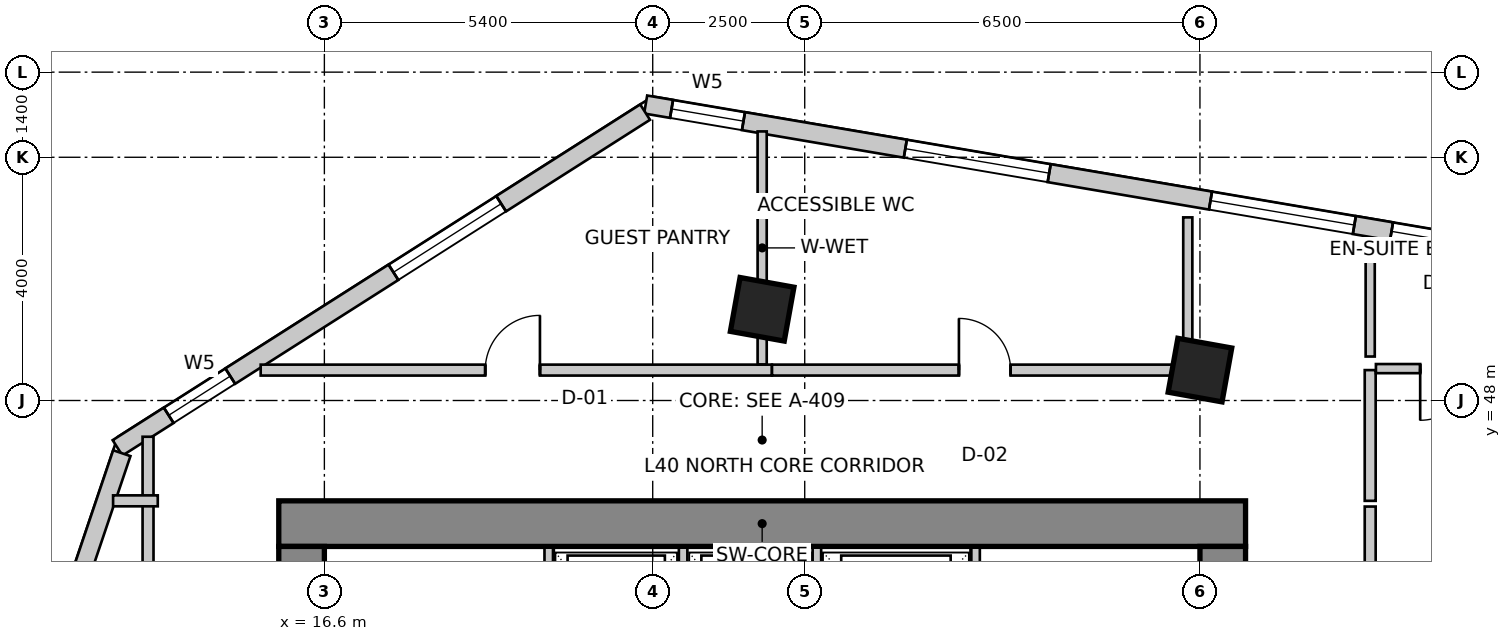
"""IFC4 building model, lengths in metres.
Left out: names, types, materials, properties, quantities, classifications, styles, units other than length and angle.
Written with IfcOpenShell. Run it as: python <this file> out.ifc"""

import sys

from ifc_helpers import new_model, si_unit, direction, frame, frame_2d, origin, origin_2d, place, context, subcontext, project, spatial, rectangle, extrude, source, transform, mapped, element, fill, save


model = new_model("IFC4")
c1 = context("Model", 3, precision=1e-05, world=origin(), true_north=direction((0.0, 1.0)))
c2 = subcontext(c1, "Body", "Model", "MODEL_VIEW")
j1 = project(units=[si_unit("LENGTHUNIT", "METRE"), si_unit("PLANEANGLEUNIT", "RADIAN")], contexts=[c1])
p1 = place(None, origin())
s1 = spatial("IfcSite", under=j1, at=p1, CompositionType="ELEMENT")
p2 = place(p1, origin())
s2 = spatial("IfcBuilding", under=s1, at=p2, CompositionType="ELEMENT")
p3 = place(p2, frame((0.0, 0.0, 161.0)))
s3 = spatial("IfcBuildingStorey", under=s2, at=p3, CompositionType="ELEMENT", Elevation=161.0)
p4 = place(p3, frame((15.85, 45.975, 0.0), z_axis=(0.0, 0.0, 1.0), x_axis=(1.0, 0.0, 0.0)))
e1 = element("IfcWall", 1, at=p4, inside=s3, PredefinedType="SHEAR", context=c2, shape_type="SweptSolid", body=[
    extrude(rectangle(XDim=15.9, YDim=0.75, at=frame_2d((7.95, 0.0))), origin(), (0.0, 0.0, 1.0), 3.6),
])
p5 = place(p3, frame((16.225, 34.2, 0.0), z_axis=(0.0, 0.0, 1.0), x_axis=(0.0, 1.0, 0.0)))
e2 = element("IfcWall", 2, at=p5, inside=s3, PredefinedType="SHEAR", context=c2, shape_type="SweptSolid", body=[
    extrude(rectangle(XDim=11.4, YDim=0.75, at=frame_2d((5.7, 0.0))), origin(), (0.0, 0.0, 1.0), 3.6),
])
m1 = source(origin(), c2, "Body", "SweptSolid", [
    extrude(rectangle(XDim=1.1, YDim=2.15, at=frame_2d((0.55, 1.075))), frame((0.0, 0.385, 0.0), z_axis=(0.0, -1.0, 0.0), x_axis=(1.0, 0.0, 0.0)), (0.0, 0.0, 1.0), 0.77),
])
p6 = place(p5, frame((7.15, 0.0, 0.0)))
e3 = element("IfcOpeningElement", 3, at=p6, cuts=e2, PredefinedType="OPENING", context=c2, shape_type="MappedRepresentation", body=[
    mapped(m1, transform((0.0, 0.0, 0.0), scale=1.0)),
])
p7 = place(p3, frame((31.375, 34.2, 0.0), z_axis=(0.0, 0.0, 1.0), x_axis=(0.0, 1.0, 0.0)))
e4 = element("IfcWall", 4, at=p7, inside=s3, PredefinedType="SHEAR", context=c2, shape_type="SweptSolid", body=[
    extrude(rectangle(XDim=11.4, YDim=0.75, at=frame_2d((5.7, 0.0))), origin(), (0.0, 0.0, 1.0), 3.6),
])
p8 = place(p7, frame((7.35, 0.0, 0.0)))
e5 = element("IfcOpeningElement", 5, at=p8, cuts=e4, PredefinedType="OPENING", context=c2, shape_type="MappedRepresentation", body=[
    mapped(m1, transform((0.0, 0.0, 0.0), scale=1.0)),
])
m2 = source(origin(), c2, "Body", "SweptSolid", [
    extrude(rectangle(XDim=0.9, YDim=0.9, at=origin_2d()), origin(), (0.0, 0.0, 1.0), 3.6),
])
for number, where, z_axis, x_axis in (
    (6, (23.8, 49.5, 0.0), (0.0, 0.0, 1.0), (0.984, -0.177, 0.0)),
    (7, (31.0, 48.5, 0.0), (0.0, 0.0, 1.0), (0.984, -0.177, 0.0)),
):
    element("IfcColumn", number, at=place(p3, frame(where, z_axis=z_axis, x_axis=x_axis)), inside=s3, PredefinedType="COLUMN", context=c2, shape_type="MappedRepresentation", body=[
        mapped(m2, transform((0.0, 0.0, 0.0), scale=1.0)),
    ])
p9 = place(p3, frame((53.561, 47.48, 0.0), z_axis=(0.0, 0.0, 1.0), x_axis=(-0.985845173895, 0.167658262868, 0.0)))
e8 = element("IfcWall", 8, at=p9, inside=s3, PredefinedType="SOLIDWALL", context=c2, shape_type="SweptSolid", body=[
    extrude(rectangle(XDim=32.132, YDim=0.3, at=frame_2d((16.066, 0.0))), origin(), (0.0, 0.0, 1.0), 3.35),
])
m3 = source(origin(), c2, "Body", "SweptSolid", [
    extrude(rectangle(XDim=2.4, YDim=2.2, at=frame_2d((1.2, 1.1))), frame((0.0, 0.16, 0.0), z_axis=(0.0, -1.0, 0.0), x_axis=(1.0, 0.0, 0.0)), (0.0, 0.0, 1.0), 0.32),
])
p10 = place(p9, frame((0.882, 0.0, 0.85)))
e9 = element("IfcOpeningElement", 9, at=p10, cuts=e8, PredefinedType="OPENING", context=c2, shape_type="MappedRepresentation", body=[
    mapped(m3, transform((0.0, 0.0, 0.0), scale=1.0)),
])
p11 = place(p9, frame((5.637, 0.0, 0.85)))
e10 = element("IfcOpeningElement", 10, at=p11, cuts=e8, PredefinedType="OPENING", context=c2, shape_type="MappedRepresentation", body=[
    mapped(m3, transform((0.0, 0.0, 0.0), scale=1.0)),
])
m4 = source(origin(), c2, "Body", "SweptSolid", [
    extrude(rectangle(XDim=1.8, YDim=2.1, at=frame_2d((0.9, 1.05))), frame((0.0, 0.16, 0.0), z_axis=(0.0, -1.0, 0.0), x_axis=(1.0, 0.0, 0.0)), (0.0, 0.0, 1.0), 0.32),
])
p12 = place(p9, frame((9.928, 0.0, 0.85)))
e11 = element("IfcOpeningElement", 11, at=p12, cuts=e8, PredefinedType="OPENING", context=c2, shape_type="MappedRepresentation", body=[
    mapped(m4, transform((0.0, 0.0, 0.0), scale=1.0)),
])
p13 = place(p9, frame((13.618, 0.0, 0.85)))
e12 = element("IfcOpeningElement", 12, at=p13, cuts=e8, PredefinedType="OPENING", context=c2, shape_type="MappedRepresentation", body=[
    mapped(m3, transform((0.0, 0.0, 0.0), scale=1.0)),
])
p14 = place(p9, frame((17.889, 0.0, 0.85)))
e13 = element("IfcOpeningElement", 13, at=p14, cuts=e8, PredefinedType="OPENING", context=c2, shape_type="MappedRepresentation", body=[
    mapped(m4, transform((0.0, 0.0, 0.0), scale=1.0)),
])
p15 = place(p9, frame((20.309, 0.0, 0.85)))
e14 = element("IfcOpeningElement", 14, at=p15, cuts=e8, PredefinedType="OPENING", context=c2, shape_type="MappedRepresentation", body=[
    mapped(m3, transform((0.0, 0.0, 0.0), scale=1.0)),
])
p16 = place(p9, frame((25.4, 0.0, 0.85)))
e15 = element("IfcOpeningElement", 15, at=p16, cuts=e8, PredefinedType="OPENING", context=c2, shape_type="MappedRepresentation", body=[
    mapped(m3, transform((0.0, 0.0, 0.0), scale=1.0)),
])
m5 = source(origin(), c2, "Body", "SweptSolid", [
    extrude(rectangle(XDim=1.2, YDim=1.6, at=frame_2d((0.6, 0.8))), frame((0.0, 0.16, 0.0), z_axis=(0.0, -1.0, 0.0), x_axis=(1.0, 0.0, 0.0)), (0.0, 0.0, 1.0), 0.32),
])
p17 = place(p9, frame((30.5, 0.0, 0.85)))
e16 = element("IfcOpeningElement", 16, at=p17, cuts=e8, PredefinedType="OPENING", context=c2, shape_type="MappedRepresentation", body=[
    mapped(m5, transform((0.0, 0.0, 0.0), scale=1.0)),
])
p18 = place(p3, frame((21.875, 52.742, 0.0), z_axis=(0.0, 0.0, 1.0), x_axis=(-0.843662465249, -0.536873956092, 0.0)))
e17 = element("IfcWall", 17, at=p18, inside=s3, PredefinedType="SOLIDWALL", context=c2, shape_type="SweptSolid", body=[
    extrude(rectangle(XDim=10.284, YDim=0.3, at=frame_2d((5.142, 0.0))), origin(), (0.0, 0.0, 1.0), 3.35),
])
m6 = source(origin(), c2, "Body", "SweptSolid", [
    extrude(rectangle(XDim=2.1, YDim=2.0, at=frame_2d((1.05, 1.0))), frame((0.0, 0.16, 0.0), z_axis=(0.0, -1.0, 0.0), x_axis=(1.0, 0.0, 0.0)), (0.0, 0.0, 1.0), 0.32),
])
p19 = place(p18, frame((2.806, 0.0, 0.85)))
e18 = element("IfcOpeningElement", 18, at=p19, cuts=e17, PredefinedType="OPENING", context=c2, shape_type="MappedRepresentation", body=[
    mapped(m6, transform((0.0, 0.0, 0.0), scale=1.0)),
])
p20 = place(p18, frame((8.087, 0.0, 0.85)))
e19 = element("IfcOpeningElement", 19, at=p20, cuts=e17, PredefinedType="OPENING", context=c2, shape_type="MappedRepresentation", body=[
    mapped(m5, transform((0.0, 0.0, 0.0), scale=1.0)),
])
p21 = place(p3, frame((13.269, 47.134, 0.0), z_axis=(0.0, 0.0, 1.0), x_axis=(-0.319929773322, -0.947441259468, 0.0)))
e20 = element("IfcWall", 20, at=p21, inside=s3, PredefinedType="SOLIDWALL", context=c2, shape_type="SweptSolid", body=[
    extrude(rectangle(XDim=16.134, YDim=0.3, at=frame_2d((8.067, 0.0))), origin(), (0.0, 0.0, 1.0), 3.35),
])
p22 = place(p21, frame((2.276, 0.0, 0.85)))
e21 = element("IfcOpeningElement", 21, at=p22, cuts=e20, PredefinedType="OPENING", context=c2, shape_type="MappedRepresentation", body=[
    mapped(m3, transform((0.0, 0.0, 0.0), scale=1.0)),
])
p23 = place(p21, frame((7.361, 0.0, 0.85)))
e22 = element("IfcOpeningElement", 22, at=p23, cuts=e20, PredefinedType="OPENING", context=c2, shape_type="MappedRepresentation", body=[
    mapped(m6, transform((0.0, 0.0, 0.0), scale=1.0)),
])
p24 = place(p21, frame((12.146, 0.0, 0.85)))
e23 = element("IfcOpeningElement", 23, at=p24, cuts=e20, PredefinedType="OPENING", context=c2, shape_type="MappedRepresentation", body=[
    mapped(m3, transform((0.0, 0.0, 0.0), scale=1.0)),
])
for number, where, z_axis, x_axis in (
    (24, (20.29, 43.28, 0.0), (0.0, 0.0, 1.0), (0.0, 1.0, 0.0)),
    (25, (27.31, 43.28, 0.0), (0.0, 0.0, 1.0), (0.0, 1.0, 0.0)),
):
    element("IfcWall", number, at=place(p3, frame(where, z_axis=z_axis, x_axis=x_axis)), inside=s3, PredefinedType="SOLIDWALL", context=c2, shape_type="SweptSolid", body=[
        extrude(rectangle(XDim=2.3, YDim=0.14, at=frame_2d((1.15, 0.0))), origin(), (0.0, 0.0, 1.0), 3.35),
    ])
for number, where, z_axis, x_axis in (
    (26, (22.5, 43.02, 0.0), (0.0, 0.0, 1.0), (0.0, 1.0, 0.0)),
    (27, (24.7, 43.02, 0.0), (0.0, 0.0, 1.0), (0.0, 1.0, 0.0)),
):
    element("IfcWall", number, at=place(p3, frame(where, z_axis=z_axis, x_axis=x_axis)), inside=s3, PredefinedType="SOLIDWALL", context=c2, shape_type="SweptSolid", body=[
        extrude(rectangle(XDim=2.56, YDim=0.14, at=frame_2d((1.28, 0.0))), origin(), (0.0, 0.0, 1.0), 3.35),
    ])
p25 = place(p3, frame((13.7, 33.544, 0.0), z_axis=(0.0, 0.0, 1.0), x_axis=(0.0, 1.0, 0.0)))
e28 = element("IfcWall", 28, at=p25, inside=s3, PredefinedType="PARTITIONING", context=c2, shape_type="SweptSolid", body=[
    extrude(rectangle(XDim=13.86, YDim=0.18, at=frame_2d((6.93, 0.0))), origin(), (0.0, 0.0, 1.0), 2.492),
])
m7 = source(origin(), c2, "Body", "SweptSolid", [
    extrude(rectangle(XDim=0.9, YDim=2.15, at=frame_2d((0.45, 1.075))), frame((0.0, 0.1, 0.0), z_axis=(0.0, -1.0, 0.0), x_axis=(1.0, 0.0, 0.0)), (0.0, 0.0, 1.0), 0.2),
])
p26 = place(p25, frame((4.253, 0.0, 0.0)))
e29 = element("IfcOpeningElement", 29, at=p26, cuts=e28, PredefinedType="OPENING", context=c2, shape_type="MappedRepresentation", body=[
    mapped(m7, transform((0.0, 0.0, 0.0), scale=1.0)),
])
p27 = place(p3, frame((13.86, 46.35, 0.0), z_axis=(0.0, 0.0, 1.0), x_axis=(-1.0, 0.0, 0.0)))
e30 = element("IfcWall", 30, at=p27, inside=s3, PredefinedType="PARTITIONING", context=c2, shape_type="SweptSolid", body=[
    extrude(rectangle(XDim=0.735, YDim=0.18, at=frame_2d((0.367, 0.0))), origin(), (0.0, 0.0, 1.0), 3.35),
])
p28 = place(p3, frame((15.552, 48.5, 0.0), z_axis=(0.0, 0.0, 1.0), x_axis=(1.0, 0.0, 0.0)))
e31 = element("IfcWall", 31, at=p28, inside=s3, PredefinedType="PARTITIONING", context=c2, shape_type="SweptSolid", body=[
    extrude(rectangle(XDim=8.407, YDim=0.18, at=frame_2d((4.204, 0.0))), origin(), (0.0, 0.0, 1.0), 3.019),
])
p29 = place(p28, frame((3.693, 0.0, 0.0)))
e32 = element("IfcOpeningElement", 32, at=p29, cuts=e31, PredefinedType="OPENING", context=c2, shape_type="MappedRepresentation", body=[
    mapped(m7, transform((0.0, 0.0, 0.0), scale=1.0)),
])
p30 = place(p3, frame((23.962, 48.5, 0.0), z_axis=(0.0, 0.0, 1.0), x_axis=(1.0, 0.0, 0.0)))
e33 = element("IfcWall", 33, at=p30, inside=s3, PredefinedType="PARTITIONING", context=c2, shape_type="SweptSolid", body=[
    extrude(rectangle(XDim=6.998, YDim=0.18, at=frame_2d((3.499, 0.0))), origin(), (0.0, 0.0, 1.0), 2.492),
])
m8 = source(origin(), c2, "Body", "SweptSolid", [
    extrude(rectangle(XDim=0.85, YDim=2.15, at=frame_2d((0.425, 1.075))), frame((0.0, 0.1, 0.0), z_axis=(0.0, -1.0, 0.0), x_axis=(1.0, 0.0, 0.0)), (0.0, 0.0, 1.0), 0.2),
])
p31 = place(p30, frame((3.074, 0.0, 0.0)))
e34 = element("IfcOpeningElement", 34, at=p31, cuts=e33, PredefinedType="OPENING", context=c2, shape_type="MappedRepresentation", body=[
    mapped(m8, transform((0.0, 0.0, 0.0), scale=1.0)),
])
p32 = place(p3, frame((33.8, 48.5, 0.0), z_axis=(0.0, 0.0, 1.0), x_axis=(0.0, -1.0, 0.0)))
e35 = element("IfcWall", 35, at=p32, inside=s3, PredefinedType="PARTITIONING", context=c2, shape_type="SweptSolid", body=[
    extrude(rectangle(XDim=2.15, YDim=0.18, at=frame_2d((1.075, 0.0))), origin(), (0.0, 0.0, 1.0), 2.492),
])
p33 = place(p3, frame((33.8, 46.256, 0.0), z_axis=(0.0, 0.0, 1.0), x_axis=(0.0, -1.0, 0.0)))
e36 = element("IfcWall", 36, at=p33, inside=s3, PredefinedType="PARTITIONING", context=c2, shape_type="SweptSolid", body=[
    extrude(rectangle(XDim=4.016, YDim=0.18, at=frame_2d((2.008, 0.0))), origin(), (0.0, 0.0, 1.0), 2.879),
])
p34 = place(p3, frame((23.8, 52.425, 0.0), z_axis=(0.0, 0.0, 1.0), x_axis=(0.0, -1.0, 0.0)))
e37 = element("IfcWall", 37, at=p34, inside=s3, PredefinedType="PARTITIONING", context=c2, shape_type="SweptSolid", body=[
    extrude(rectangle(XDim=3.831, YDim=0.15, at=frame_2d((1.916, 0.0))), origin(), (0.0, 0.0, 1.0), 2.492),
])
p35 = place(p3, frame((36.2, 48.524, 0.0), z_axis=(0.0, 0.0, 1.0), x_axis=(-1.0, 0.0, 0.0)))
e38 = element("IfcWall", 38, at=p35, inside=s3, PredefinedType="PARTITIONING", context=c2, shape_type="SweptSolid", body=[
    extrude(rectangle(XDim=2.306, YDim=0.15, at=frame_2d((1.153, 0.0))), origin(), (0.0, 0.0, 1.0), 3.35),
])
m9 = source(origin(), c2, "Body", "SweptSolid", [
    extrude(rectangle(XDim=0.85, YDim=2.15, at=frame_2d((0.425, 1.075))), frame((0.0, 0.085, 0.0), z_axis=(0.0, -1.0, 0.0), x_axis=(1.0, 0.0, 0.0)), (0.0, 0.0, 1.0), 0.17),
])
p36 = place(p35, frame((0.728, 0.0, 0.0)))
e39 = element("IfcOpeningElement", 39, at=p36, cuts=e38, PredefinedType="OPENING", context=c2, shape_type="MappedRepresentation", body=[
    mapped(m9, transform((0.0, 0.0, 0.0), scale=1.0)),
])
p37 = place(p3, frame((30.8, 51.011, 0.0), z_axis=(0.0, 0.0, 1.0), x_axis=(0.0, -1.0, 0.0)))
e40 = element("IfcWall", 40, at=p37, inside=s3, PredefinedType="PARTITIONING", context=c2, shape_type="SweptSolid", body=[
    extrude(rectangle(XDim=2.292, YDim=0.15, at=frame_2d((1.146, 0.0))), origin(), (0.0, 0.0, 1.0), 3.35),
])
p38 = place(p3, frame((33.8, 48.723, 0.0), z_axis=(0.0, 0.0, 1.0), x_axis=(0.0, 1.0, 0.0)))
e41 = element("IfcWall", 41, at=p38, inside=s3, PredefinedType="PARTITIONING", context=c2, shape_type="SweptSolid", body=[
    extrude(rectangle(XDim=1.778, YDim=0.15, at=frame_2d((0.889, 0.0))), origin(), (0.0, 0.0, 1.0), 3.35),
])
m10 = source(origin(), c2, "Body", "SweptSolid", [
    extrude(rectangle(XDim=1.8, YDim=2.1, at=frame_2d((0.9, 1.05))), frame((0.0, -0.015, 0.0), z_axis=(0.0, -1.0, 0.0), x_axis=(1.0, 0.0, 0.0)), (0.0, 0.0, 1.0), 0.06),
])
p39 = place(p14, origin())
e42 = element("IfcWindow", 42, at=p39, inside=s3, PartitioningType="SINGLE_PANEL", PredefinedType="WINDOW", context=c2, shape_type="MappedRepresentation", body=[
    mapped(m10, transform((0.0, 0.0, 0.0), scale=1.0)),
])
fill(e13, e42)
m11 = source(origin(), c2, "Body", "SweptSolid", [
    extrude(rectangle(XDim=2.4, YDim=2.2, at=frame_2d((1.2, 1.1))), frame((0.0, -0.015, 0.0), z_axis=(0.0, -1.0, 0.0), x_axis=(1.0, 0.0, 0.0)), (0.0, 0.0, 1.0), 0.06),
])
p40 = place(p15, origin())
e43 = element("IfcWindow", 43, at=p40, inside=s3, PartitioningType="SINGLE_PANEL", PredefinedType="WINDOW", context=c2, shape_type="MappedRepresentation", body=[
    mapped(m11, transform((0.0, 0.0, 0.0), scale=1.0)),
])
fill(e14, e43)
p41 = place(p16, origin())
e44 = element("IfcWindow", 44, at=p41, inside=s3, PartitioningType="SINGLE_PANEL", PredefinedType="WINDOW", context=c2, shape_type="MappedRepresentation", body=[
    mapped(m11, transform((0.0, 0.0, 0.0), scale=1.0)),
])
fill(e15, e44)
m12 = source(origin(), c2, "Body", "SweptSolid", [
    extrude(rectangle(XDim=1.2, YDim=1.6, at=frame_2d((0.6, 0.8))), frame((0.0, -0.015, 0.0), z_axis=(0.0, -1.0, 0.0), x_axis=(1.0, 0.0, 0.0)), (0.0, 0.0, 1.0), 0.06),
])
p42 = place(p17, origin())
e45 = element("IfcWindow", 45, at=p42, inside=s3, PartitioningType="SINGLE_PANEL", PredefinedType="WINDOW", context=c2, shape_type="MappedRepresentation", body=[
    mapped(m12, transform((0.0, 0.0, 0.0), scale=1.0)),
])
fill(e16, e45)
m13 = source(origin(), c2, "Body", "SweptSolid", [
    extrude(rectangle(XDim=2.1, YDim=2.0, at=frame_2d((1.05, 1.0))), frame((0.0, -0.015, 0.0), z_axis=(0.0, -1.0, 0.0), x_axis=(1.0, 0.0, 0.0)), (0.0, 0.0, 1.0), 0.06),
])
p43 = place(p19, origin())
e46 = element("IfcWindow", 46, at=p43, inside=s3, PartitioningType="SINGLE_PANEL", PredefinedType="WINDOW", context=c2, shape_type="MappedRepresentation", body=[
    mapped(m13, transform((0.0, 0.0, 0.0), scale=1.0)),
])
fill(e18, e46)
p44 = place(p20, origin())
e47 = element("IfcWindow", 47, at=p44, inside=s3, PartitioningType="SINGLE_PANEL", PredefinedType="WINDOW", context=c2, shape_type="MappedRepresentation", body=[
    mapped(m12, transform((0.0, 0.0, 0.0), scale=1.0)),
])
fill(e19, e47)
m14 = source(origin(), c2, "Body", "SweptSolid", [
    extrude(rectangle(XDim=0.9, YDim=2.15, at=frame_2d((0.45, 1.075))), frame((0.0, 0.025, 0.0), z_axis=(0.0, -1.0, 0.0), x_axis=(1.0, 0.0, 0.0)), (0.0, 0.0, 1.0), 0.05),
])
p45 = place(p29, origin())
e48 = element("IfcDoor", 48, at=p45, inside=s3, OperationType="SINGLE_SWING_RIGHT", PredefinedType="DOOR", context=c2, shape_type="MappedRepresentation", body=[
    mapped(m14, transform((0.0, 0.0, 0.0), scale=1.0)),
])
fill(e32, e48)
m15 = source(origin(), c2, "Body", "SweptSolid", [
    extrude(rectangle(XDim=0.85, YDim=2.15, at=frame_2d((0.425, 1.075))), frame((0.0, 0.025, 0.0), z_axis=(0.0, -1.0, 0.0), x_axis=(1.0, 0.0, 0.0)), (0.0, 0.0, 1.0), 0.05),
])
p46 = place(p31, origin())
e49 = element("IfcDoor", 49, at=p46, inside=s3, OperationType="SINGLE_SWING_LEFT", PredefinedType="DOOR", context=c2, shape_type="MappedRepresentation", body=[
    mapped(m15, transform((0.0, 0.0, 0.0), scale=1.0)),
])
fill(e34, e49)
p47 = place(p36, origin())
e50 = element("IfcDoor", 50, at=p47, inside=s3, OperationType="SINGLE_SWING_RIGHT", PredefinedType="DOOR", context=c2, shape_type="MappedRepresentation", body=[
    mapped(m15, transform((0.0, 0.0, 0.0), scale=1.0)),
])
fill(e39, e50)
save(model, sys.argv[1])
